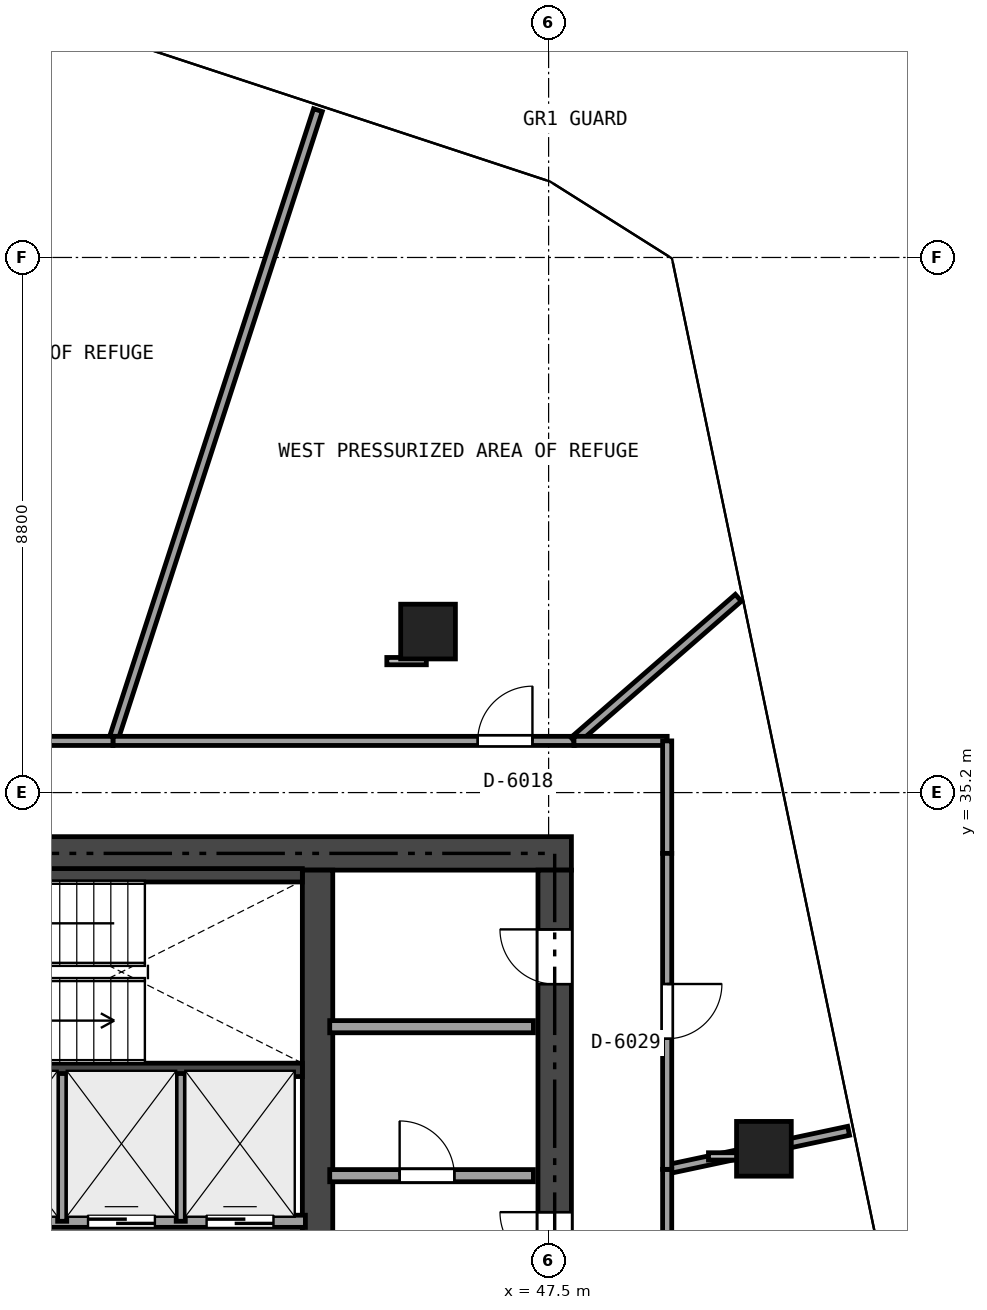
"""IFC4 building model, lengths in metres.
Left out: names, types, materials, properties, quantities, classifications, styles, units other than length and angle.
Written with IfcOpenShell. Run it as: python <this file> out.ifc"""

import sys

from ifc_helpers import new_model, si_unit, direction, frame, frame_2d, origin, origin_2d, place, context, subcontext, project, spatial, rectangle, extrude, element, fill, save


model = new_model("IFC4")
c1 = context("Model", 3, precision=1e-05, world=origin(), true_north=direction((0.0, 1.0)))
c2 = subcontext(c1, "Body", "Model", "MODEL_VIEW")
j1 = project(units=[si_unit("LENGTHUNIT", "METRE"), si_unit("PLANEANGLEUNIT", "RADIAN")], contexts=[c1])
p1 = place(None, origin())
s1 = spatial("IfcSite", under=j1, at=p1, CompositionType="ELEMENT")
p2 = place(p1, origin())
s2 = spatial("IfcBuilding", under=s1, at=p2, CompositionType="ELEMENT")
p3 = place(p2, frame((0.0, 0.0, 223.8)))
s3 = spatial("IfcBuildingStorey", under=s2, at=p3, CompositionType="ELEMENT", Elevation=223.8)
p4 = place(p3, frame((26.525, 34.2, 0.0), z_axis=(0.0, 0.0, 1.0), x_axis=(1.0, 0.0, 0.0)))
e1 = element("IfcWall", 1, at=p4, inside=s3, PredefinedType="SHEAR", context=c2, shape_type="SweptSolid", body=[
    extrude(rectangle(XDim=21.35, YDim=0.55, at=frame_2d((10.675, 0.0))), origin(), (0.0, 0.0, 1.0), 4.14),
])
p5 = place(p4, frame((9.675, 0.0, 0.0)))
e2 = element("IfcOpeningElement", 2, at=p5, cuts=e1, PredefinedType="OPENING", context=c2, shape_type="SweptSolid", body=[
    extrude(rectangle(XDim=1.1, YDim=2.15, at=frame_2d((0.55, 1.075))), frame((0.0, 0.285, 0.0), z_axis=(0.0, -1.0, 0.0), x_axis=(1.0, 0.0, 0.0)), (0.0, 0.0, 1.0), 0.57),
])
p6 = place(p4, frame((1.925, 0.0, 0.0)))
e3 = element("IfcOpeningElement", 3, at=p6, cuts=e1, PredefinedType="OPENING", context=c2, shape_type="SweptSolid", body=[
    extrude(rectangle(XDim=0.9, YDim=2.1, at=frame_2d((0.45, 1.05))), frame((0.0, 0.285, 0.0), z_axis=(0.0, -1.0, 0.0), x_axis=(1.0, 0.0, 0.0)), (0.0, 0.0, 1.0), 0.57),
])
p7 = place(p4, frame((6.225, 0.0, 0.0)))
e4 = element("IfcOpeningElement", 4, at=p7, cuts=e1, PredefinedType="OPENING", context=c2, shape_type="SweptSolid", body=[
    extrude(rectangle(XDim=0.9, YDim=2.1, at=frame_2d((0.45, 1.05))), frame((0.0, 0.285, 0.0), z_axis=(0.0, -1.0, 0.0), x_axis=(1.0, 0.0, 0.0)), (0.0, 0.0, 1.0), 0.57),
])
p8 = place(p3, frame((47.6, 18.875, 0.0), z_axis=(0.0, 0.0, 1.0), x_axis=(0.0, 1.0, 0.0)))
e5 = element("IfcWall", 5, at=p8, inside=s3, PredefinedType="SHEAR", context=c2, shape_type="SweptSolid", body=[
    extrude(rectangle(XDim=15.05, YDim=0.55, at=frame_2d((7.525, 0.0))), origin(), (0.0, 0.0, 1.0), 4.14),
])
p9 = place(p8, frame((6.625, 0.0, 0.0)))
e6 = element("IfcOpeningElement", 6, at=p9, cuts=e5, PredefinedType="OPENING", context=c2, shape_type="SweptSolid", body=[
    extrude(rectangle(XDim=1.1, YDim=2.15, at=frame_2d((0.55, 1.075))), frame((0.0, 0.285, 0.0), z_axis=(0.0, -1.0, 0.0), x_axis=(1.0, 0.0, 0.0)), (0.0, 0.0, 1.0), 0.57),
])
p10 = place(p8, frame((8.525, 0.0, 0.0)))
e7 = element("IfcOpeningElement", 7, at=p10, cuts=e5, PredefinedType="OPENING", context=c2, shape_type="SweptSolid", body=[
    extrude(rectangle(XDim=0.9, YDim=2.1, at=frame_2d((0.45, 1.05))), frame((0.0, 0.285, 0.0), z_axis=(0.0, -1.0, 0.0), x_axis=(1.0, 0.0, 0.0)), (0.0, 0.0, 1.0), 0.57),
])
p11 = place(p8, frame((13.175, 0.0, 0.0)))
e8 = element("IfcOpeningElement", 8, at=p11, cuts=e5, PredefinedType="OPENING", context=c2, shape_type="SweptSolid", body=[
    extrude(rectangle(XDim=0.9, YDim=2.1, at=frame_2d((0.45, 1.05))), frame((0.0, 0.285, 0.0), z_axis=(0.0, -1.0, 0.0), x_axis=(1.0, 0.0, 0.0)), (0.0, 0.0, 1.0), 0.57),
])
p12 = place(p3, frame((43.7, 18.875, 0.0), z_axis=(0.0, 0.0, 1.0), x_axis=(0.0, 1.0, 0.0)))
e9 = element("IfcWall", 9, at=p12, inside=s3, PredefinedType="SHEAR", context=c2, shape_type="SweptSolid", body=[
    extrude(rectangle(XDim=15.05, YDim=0.5, at=frame_2d((7.525, 0.0))), origin(), (0.0, 0.0, 1.0), 4.14),
])
p13 = place(p12, frame((8.125, 0.0, 0.0)))
e10 = element("IfcOpeningElement", 10, at=p13, cuts=e9, PredefinedType="OPENING", context=c2, shape_type="SweptSolid", body=[
    extrude(rectangle(XDim=0.9, YDim=2.1, at=frame_2d((0.45, 1.05))), frame((0.0, 0.26, 0.0), z_axis=(0.0, -1.0, 0.0), x_axis=(1.0, 0.0, 0.0)), (0.0, 0.0, 1.0), 0.52),
])
p14 = place(p3, frame((35.84, 30.64, 0.0), z_axis=(0.0, 0.0, 1.0), x_axis=(1.0, 0.0, 0.0)))
e11 = element("IfcWall", 11, at=p14, inside=s3, PredefinedType="SHEAR", context=c2, shape_type="SweptSolid", body=[
    extrude(rectangle(XDim=7.61, YDim=0.22, at=frame_2d((3.805, 0.0))), origin(), (0.0, 0.0, 1.0), 4.14),
])
p15 = place(p3, frame((37.55, 33.84, 0.0), z_axis=(0.0, 0.0, 1.0), x_axis=(1.0, 0.0, 0.0)))
e12 = element("IfcWall", 12, at=p15, inside=s3, PredefinedType="SHEAR", context=c2, shape_type="SweptSolid", body=[
    extrude(rectangle(XDim=5.9, YDim=0.22, at=frame_2d((2.95, 0.0))), origin(), (0.0, 0.0, 1.0), 4.14),
])
for number, where, z_axis, x_axis in (
    (13, (51.041, 29.342, 0.0), (0.0, 0.0, 1.0), (1.0, 0.0, 0.0)),
    (14, (45.517, 37.848, 0.0), (0.0, 0.0, 1.0), (1.0, 0.0, 0.0)),
):
    element("IfcColumn", number, at=place(p3, frame(where, z_axis=z_axis, x_axis=x_axis)), inside=s3, PredefinedType="COLUMN", context=c2, shape_type="SweptSolid", body=[
        extrude(rectangle(XDim=0.9, YDim=0.9, at=origin_2d()), origin(), (0.0, 0.0, 1.0), 4.14),
    ])
p16 = place(p3, frame((43.9, 28.9, 0.0), z_axis=(0.0, 0.0, 1.0), x_axis=(1.0, 0.0, 0.0)))
e15 = element("IfcWall", 15, at=p16, inside=s3, PredefinedType="SOLIDWALL", context=c2, shape_type="SweptSolid", body=[
    extrude(rectangle(XDim=3.35, YDim=0.2, at=frame_2d((1.675, 0.0))), origin(), (0.0, 0.0, 1.0), 4.14),
])
p17 = place(p16, frame((1.15, 0.0, 0.0)))
e16 = element("IfcOpeningElement", 16, at=p17, cuts=e15, PredefinedType="OPENING", context=c2, shape_type="SweptSolid", body=[
    extrude(rectangle(XDim=0.9, YDim=2.1, at=frame_2d((0.45, 1.05))), frame((0.0, 0.11, 0.0), z_axis=(0.0, -1.0, 0.0), x_axis=(1.0, 0.0, 0.0)), (0.0, 0.0, 1.0), 0.22),
])
p18 = place(p3, frame((43.9, 31.35, 0.0), z_axis=(0.0, 0.0, 1.0), x_axis=(1.0, 0.0, 0.0)))
e17 = element("IfcWall", 17, at=p18, inside=s3, PredefinedType="SOLIDWALL", context=c2, shape_type="SweptSolid", body=[
    extrude(rectangle(XDim=3.35, YDim=0.2, at=frame_2d((1.675, 0.0))), origin(), (0.0, 0.0, 1.0), 4.14),
])
p19 = place(p3, frame((35.62, 28.15, 0.0), z_axis=(0.0, 0.0, 1.0), x_axis=(1.0, 0.0, 0.0)))
e18 = element("IfcWall", 18, at=p19, inside=s3, PredefinedType="SOLIDWALL", context=c2, shape_type="SweptSolid", body=[
    extrude(rectangle(XDim=7.88, YDim=0.2, at=frame_2d((3.94, 0.0))), origin(), (0.0, 0.0, 1.0), 4.14),
])
p20 = place(p19, frame((0.405, 0.0, 0.0)))
e19 = element("IfcOpeningElement", 19, at=p20, cuts=e18, PredefinedType="OPENING", context=c2, shape_type="SweptSolid", body=[
    extrude(rectangle(XDim=1.1, YDim=2.15, at=frame_2d((0.55, 1.075))), frame((0.0, 0.11, 0.0), z_axis=(0.0, -1.0, 0.0), x_axis=(1.0, 0.0, 0.0)), (0.0, 0.0, 1.0), 0.22),
])
p21 = place(p19, frame((2.355, 0.0, 0.0)))
e20 = element("IfcOpeningElement", 20, at=p21, cuts=e18, PredefinedType="OPENING", context=c2, shape_type="SweptSolid", body=[
    extrude(rectangle(XDim=1.1, YDim=2.15, at=frame_2d((0.55, 1.075))), frame((0.0, 0.11, 0.0), z_axis=(0.0, -1.0, 0.0), x_axis=(1.0, 0.0, 0.0)), (0.0, 0.0, 1.0), 0.22),
])
p22 = place(p19, frame((4.305, 0.0, 0.0)))
e21 = element("IfcOpeningElement", 21, at=p22, cuts=e18, PredefinedType="OPENING", context=c2, shape_type="SweptSolid", body=[
    extrude(rectangle(XDim=1.1, YDim=2.15, at=frame_2d((0.55, 1.075))), frame((0.0, 0.11, 0.0), z_axis=(0.0, -1.0, 0.0), x_axis=(1.0, 0.0, 0.0)), (0.0, 0.0, 1.0), 0.22),
])
p23 = place(p19, frame((6.255, 0.0, 0.0)))
e22 = element("IfcOpeningElement", 22, at=p23, cuts=e18, PredefinedType="OPENING", context=c2, shape_type="SweptSolid", body=[
    extrude(rectangle(XDim=1.1, YDim=2.15, at=frame_2d((0.55, 1.075))), frame((0.0, 0.11, 0.0), z_axis=(0.0, -1.0, 0.0), x_axis=(1.0, 0.0, 0.0)), (0.0, 0.0, 1.0), 0.22),
])
for number, where, z_axis, x_axis in (
    (23, (39.5, 28.15, 0.0), (0.0, 0.0, 1.0), (0.0, 1.0, 0.0)),
    (24, (41.45, 28.15, 0.0), (0.0, 0.0, 1.0), (0.0, 1.0, 0.0)),
):
    element("IfcWall", number, at=place(p3, frame(where, z_axis=z_axis, x_axis=x_axis)), inside=s3, PredefinedType="PARTITIONING", context=c2, shape_type="SweptSolid", body=[
        extrude(rectangle(XDim=2.43, YDim=0.15, at=frame_2d((1.215, 0.0))), origin(), (0.0, 0.0, 1.0), 4.14),
    ])
p24 = place(p3, frame((43.706, 46.423, 0.0), z_axis=(0.0, 0.0, 1.0), x_axis=(-0.309073925146, -0.951038016483, 0.0)))
e25 = element("IfcWall", 25, at=p24, inside=s3, PredefinedType="PARTITIONING", context=c2, shape_type="SweptSolid", body=[
    extrude(rectangle(XDim=10.907, YDim=0.15, at=frame_2d((5.454, 0.0))), origin(), (0.0, 0.0, 1.0), 3.725),
])
p25 = place(p3, frame((40.335, 36.05, 0.0), z_axis=(0.0, 0.0, 1.0), x_axis=(1.0, 0.0, 0.0)))
e26 = element("IfcWall", 26, at=p25, inside=s3, PredefinedType="PARTITIONING", context=c2, shape_type="SweptSolid", body=[
    extrude(rectangle(XDim=7.582, YDim=0.15, at=frame_2d((3.791, 0.0))), origin(), (0.0, 0.0, 1.0), 3.125),
])
p26 = place(p25, frame((5.999, 0.0, 0.0)))
e27 = element("IfcOpeningElement", 27, at=p26, cuts=e26, PredefinedType="OPENING", context=c2, shape_type="SweptSolid", body=[
    extrude(rectangle(XDim=0.9, YDim=2.0, at=frame_2d((0.45, 1.0))), frame((0.0, 0.085, 0.0), z_axis=(0.0, -1.0, 0.0), x_axis=(1.0, 0.0, 0.0)), (0.0, 0.0, 1.0), 0.17),
])
p27 = place(p3, frame((47.917, 36.05, 0.0), z_axis=(0.0, 0.0, 1.0), x_axis=(0.754262235438, 0.656573286231, 0.0)))
e28 = element("IfcWall", 28, at=p27, inside=s3, PredefinedType="PARTITIONING", context=c2, shape_type="SweptSolid", body=[
    extrude(rectangle(XDim=3.584, YDim=0.15, at=frame_2d((1.792, 0.0))), origin(), (0.0, 0.0, 1.0), 4.14),
])
p28 = place(p3, frame((35.149, 36.05, 0.0), z_axis=(0.0, 0.0, 1.0), x_axis=(1.0, 0.0, 0.0)))
e29 = element("IfcWall", 29, at=p28, inside=s3, PredefinedType="PARTITIONING", context=c2, shape_type="SweptSolid", body=[
    extrude(rectangle(XDim=5.186, YDim=0.15, at=frame_2d((2.593, 0.0))), origin(), (0.0, 0.0, 1.0), 3.125),
])
p29 = place(p28, frame((2.143, 0.0, 0.0)))
e30 = element("IfcOpeningElement", 30, at=p29, cuts=e29, PredefinedType="OPENING", context=c2, shape_type="SweptSolid", body=[
    extrude(rectangle(XDim=0.9, YDim=2.0, at=frame_2d((0.45, 1.0))), frame((0.0, 0.085, 0.0), z_axis=(0.0, -1.0, 0.0), x_axis=(1.0, 0.0, 0.0)), (0.0, 0.0, 1.0), 0.17),
])
p30 = place(p3, frame((52.434, 29.638, 0.0), z_axis=(0.0, 0.0, 1.0), x_axis=(-0.978165155449, -0.207829085225, 0.0)))
e31 = element("IfcWall", 31, at=p30, inside=s3, PredefinedType="PARTITIONING", context=c2, shape_type="SweptSolid", body=[
    extrude(rectangle(XDim=3.051, YDim=0.15, at=frame_2d((1.525, 0.0))), origin(), (0.0, 0.0, 1.0), 3.125),
])
p31 = place(p3, frame((49.45, 29.004, 0.0), z_axis=(0.0, 0.0, 1.0), x_axis=(0.0, -1.0, 0.0)))
e32 = element("IfcWall", 32, at=p31, inside=s3, PredefinedType="PARTITIONING", context=c2, shape_type="SweptSolid", body=[
    extrude(rectangle(XDim=6.584, YDim=0.15, at=frame_2d((3.292, 0.0))), origin(), (0.0, 0.0, 1.0), 3.125),
])
p32 = place(p31, frame((2.842, 0.0, 0.0)))
e33 = element("IfcOpeningElement", 33, at=p32, cuts=e32, PredefinedType="OPENING", context=c2, shape_type="SweptSolid", body=[
    extrude(rectangle(XDim=0.9, YDim=2.0, at=frame_2d((0.45, 1.0))), frame((0.0, 0.085, 0.0), z_axis=(0.0, -1.0, 0.0), x_axis=(1.0, 0.0, 0.0)), (0.0, 0.0, 1.0), 0.17),
])
p33 = place(p3, frame((47.917, 36.05, 0.0), z_axis=(0.0, 0.0, 1.0), x_axis=(1.0, 0.0, 0.0)))
e34 = element("IfcWall", 34, at=p33, inside=s3, PredefinedType="PARTITIONING", context=c2, shape_type="SweptSolid", body=[
    extrude(rectangle(XDim=1.533, YDim=0.15, at=frame_2d((0.767, 0.0))), origin(), (0.0, 0.0, 1.0), 4.14),
])
p34 = place(p3, frame((49.45, 36.05, 0.0), z_axis=(0.0, 0.0, 1.0), x_axis=(0.0, -1.0, 0.0)))
e35 = element("IfcWall", 35, at=p34, inside=s3, PredefinedType="PARTITIONING", context=c2, shape_type="SweptSolid", body=[
    extrude(rectangle(XDim=1.85, YDim=0.15, at=frame_2d((0.925, 0.0))), origin(), (0.0, 0.0, 1.0), 4.14),
])
p35 = place(p3, frame((49.45, 34.2, 0.0), z_axis=(0.0, 0.0, 1.0), x_axis=(0.0, -1.0, 0.0)))
e36 = element("IfcWall", 36, at=p35, inside=s3, PredefinedType="PARTITIONING", context=c2, shape_type="SweptSolid", body=[
    extrude(rectangle(XDim=5.196, YDim=0.15, at=frame_2d((2.598, 0.0))), origin(), (0.0, 0.0, 1.0), 3.125),
])
p36 = place(p35, frame((2.148, 0.0, 0.0)))
e37 = element("IfcOpeningElement", 37, at=p36, cuts=e36, PredefinedType="OPENING", context=c2, shape_type="SweptSolid", body=[
    extrude(rectangle(XDim=0.9, YDim=2.0, at=frame_2d((0.45, 1.0))), frame((0.0, 0.085, 0.0), z_axis=(0.0, -1.0, 0.0), x_axis=(1.0, 0.0, 0.0)), (0.0, 0.0, 1.0), 0.17),
])
p37 = place(p10, origin())
e38 = element("IfcDoor", 38, at=p37, inside=s3, OperationType="SINGLE_SWING_RIGHT", PredefinedType="DOOR", context=c2, shape_type="SweptSolid", body=[
    extrude(rectangle(XDim=0.9, YDim=2.1, at=frame_2d((0.45, 1.05))), frame((0.0, 0.025, 0.0), z_axis=(0.0, -1.0, 0.0), x_axis=(1.0, 0.0, 0.0)), (0.0, 0.0, 1.0), 0.05),
])
fill(e7, e38)
p38 = place(p17, origin())
e39 = element("IfcDoor", 39, at=p38, inside=s3, OperationType="SINGLE_SWING_LEFT", PredefinedType="DOOR", context=c2, shape_type="SweptSolid", body=[
    extrude(rectangle(XDim=0.9, YDim=2.1, at=frame_2d((0.45, 1.05))), frame((0.0, 0.025, 0.0), z_axis=(0.0, -1.0, 0.0), x_axis=(1.0, 0.0, 0.0)), (0.0, 0.0, 1.0), 0.05),
])
fill(e16, e39)
p39 = place(p11, origin())
e40 = element("IfcDoor", 40, at=p39, inside=s3, OperationType="SINGLE_SWING_RIGHT", PredefinedType="DOOR", context=c2, shape_type="SweptSolid", body=[
    extrude(rectangle(XDim=0.9, YDim=2.1, at=frame_2d((0.45, 1.05))), frame((0.0, 0.025, 0.0), z_axis=(0.0, -1.0, 0.0), x_axis=(1.0, 0.0, 0.0)), (0.0, 0.0, 1.0), 0.05),
])
fill(e8, e40)
p40 = place(p22, origin())
e41 = element("IfcDoor", 41, at=p40, inside=s3, OperationType="SLIDING_TO_LEFT", PredefinedType="DOOR", context=c2, shape_type="SweptSolid", body=[
    extrude(rectangle(XDim=1.1, YDim=2.15, at=frame_2d((0.55, 1.075))), frame((0.0, 0.025, 0.0), z_axis=(0.0, -1.0, 0.0), x_axis=(1.0, 0.0, 0.0)), (0.0, 0.0, 1.0), 0.05),
])
fill(e21, e41)
p41 = place(p23, origin())
e42 = element("IfcDoor", 42, at=p41, inside=s3, OperationType="SLIDING_TO_LEFT", PredefinedType="DOOR", context=c2, shape_type="SweptSolid", body=[
    extrude(rectangle(XDim=1.1, YDim=2.15, at=frame_2d((0.55, 1.075))), frame((0.0, 0.025, 0.0), z_axis=(0.0, -1.0, 0.0), x_axis=(1.0, 0.0, 0.0)), (0.0, 0.0, 1.0), 0.05),
])
fill(e22, e42)
p42 = place(p26, origin())
e43 = element("IfcDoor", 43, at=p42, inside=s3, OperationType="SINGLE_SWING_RIGHT", PredefinedType="DOOR", context=c2, shape_type="SweptSolid", body=[
    extrude(rectangle(XDim=0.9, YDim=2.0, at=frame_2d((0.45, 1.0))), frame((0.0, 0.025, 0.0), z_axis=(0.0, -1.0, 0.0), x_axis=(1.0, 0.0, 0.0)), (0.0, 0.0, 1.0), 0.05),
])
fill(e27, e43)
p43 = place(p36, origin())
e44 = element("IfcDoor", 44, at=p43, inside=s3, OperationType="SINGLE_SWING_LEFT", PredefinedType="DOOR", context=c2, shape_type="SweptSolid", body=[
    extrude(rectangle(XDim=0.9, YDim=2.0, at=frame_2d((0.45, 1.0))), frame((0.0, 0.025, 0.0), z_axis=(0.0, -1.0, 0.0), x_axis=(1.0, 0.0, 0.0)), (0.0, 0.0, 1.0), 0.05),
])
fill(e37, e44)
save(model, sys.argv[1])
